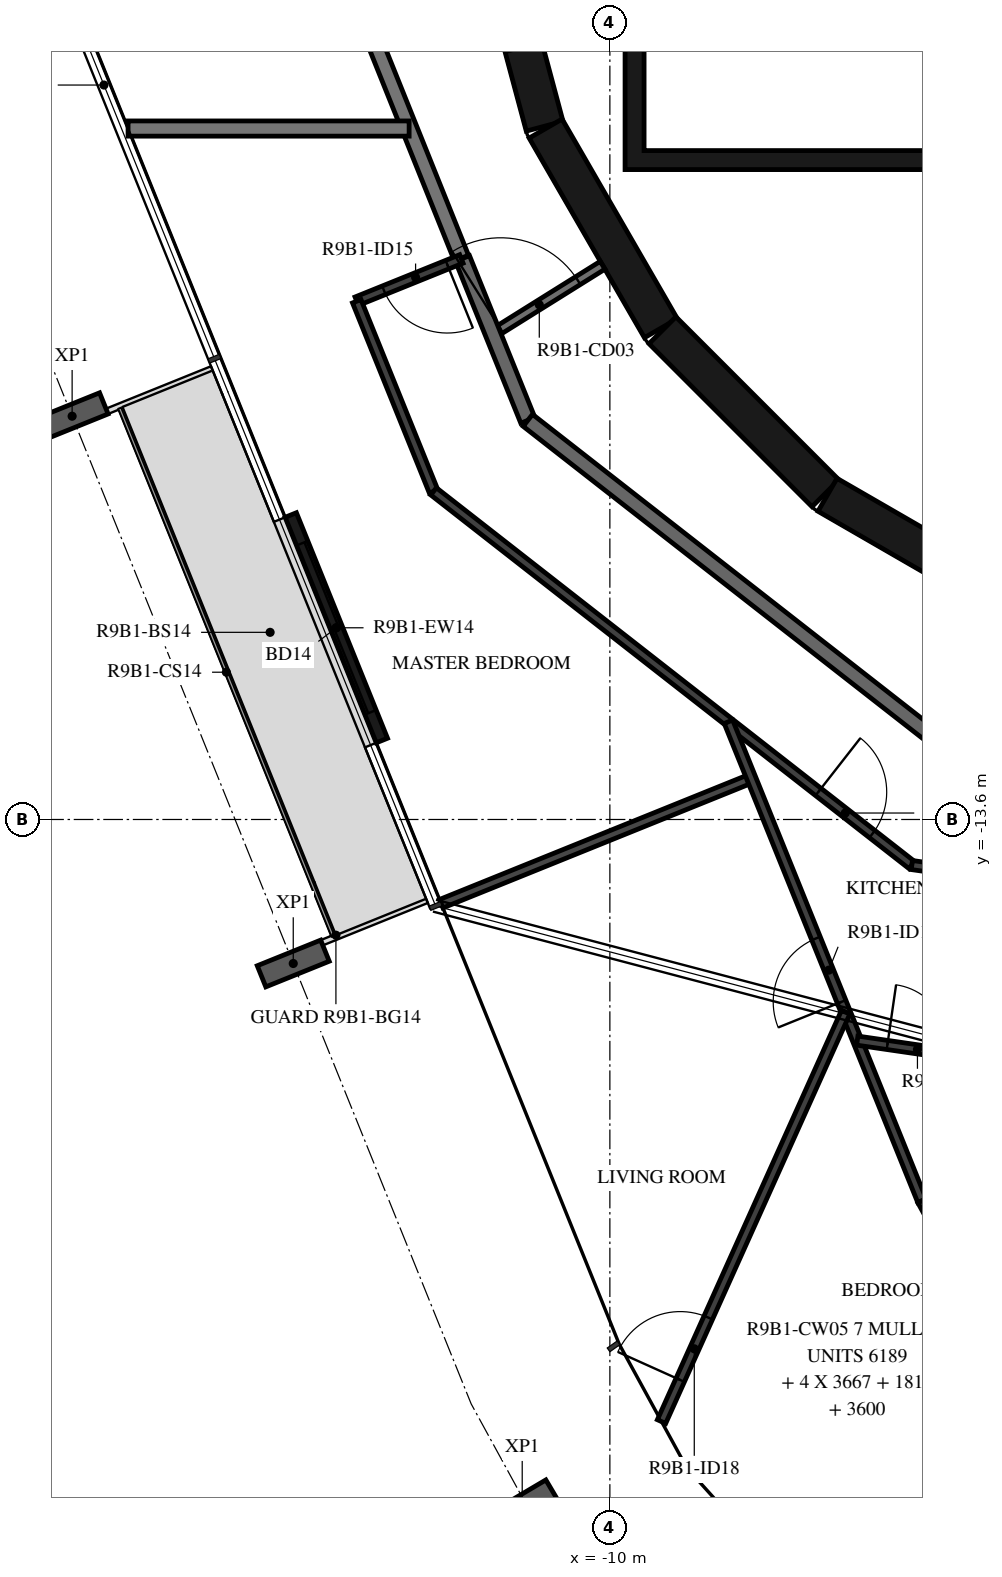
"""IFC4 building model, lengths in metres.
Left out: names, types, materials, properties, quantities, classifications, styles, units other than length and angle.
Written with IfcOpenShell. Run it as: python <this file> out.ifc"""

import sys

from ifc_helpers import new_model, si_unit, direction, frame, frame_2d, origin, origin_2d, place, context, subcontext, project, spatial, polyline, rectangle, i_section, outline, extrude, element, fill, save


model = new_model("IFC4")
c1 = context("Model", 3, precision=1e-05, world=origin(), true_north=direction((0.0, 1.0)))
c2 = subcontext(c1, "Body", "Model", "MODEL_VIEW")
j1 = project(units=[si_unit("LENGTHUNIT", "METRE"), si_unit("PLANEANGLEUNIT", "RADIAN")], contexts=[c1])
p1 = place(None, origin())
s1 = spatial("IfcSite", under=j1, at=p1, CompositionType="ELEMENT")
p2 = place(p1, origin())
s2 = spatial("IfcBuilding", under=s1, at=p2, CompositionType="ELEMENT")
p3 = place(p2, frame((0.0, 0.0, 343.5)))
s3 = spatial("IfcBuildingStorey", under=s2, at=p3, CompositionType="ELEMENT", Elevation=343.5)
for number, where, z_axis, x_axis in (
    (1, (-17.075, -8.294, -0.38), (0.0, 0.0, 1.0), (-0.375, 0.927, 0.0)),
    (2, (-14.166, -15.495, -0.38), (0.0, 0.0, 1.0), (-0.375, 0.927, 0.0)),
    (3, (-11.153, -22.647, -0.38), (0.0, 0.0, 1.0), (-0.509, 0.861, 0.0)),
):
    element("IfcColumn", number, at=place(p3, frame(where, z_axis=z_axis, x_axis=x_axis)), inside=s3, PredefinedType="COLUMN", context=c2, shape_type="SweptSolid", body=[
        extrude(i_section(OverallWidth=0.3, OverallDepth=0.9, WebThickness=0.019, FlangeThickness=0.035, FilletRadius=0.03, at=origin_2d()), origin(), (0.0, 0.0, 1.0), 3.5),
    ])
p4 = place(p3, frame((-14.198, -9.594, 0.0), z_axis=(0.0, 0.0, 1.0), x_axis=(0.374624519695, -0.927176611678, 0.0)))
e4 = element("IfcWall", 4, at=p4, inside=s3, PredefinedType="STANDARD", context=c2, shape_type="SweptSolid", body=[
    extrude(rectangle(XDim=3.2, YDim=0.16, at=frame_2d((1.6, 0.0))), origin(), (0.0, 0.0, 1.0), 3.12),
])
p5 = place(p4, frame((0.4, 0.0, 0.0)))
e5 = element("IfcOpeningElement", 5, at=p5, cuts=e4, PredefinedType="OPENING", context=c2, shape_type="SweptSolid", body=[
    extrude(rectangle(XDim=2.4, YDim=2.4, at=frame_2d((1.2, 1.2))), frame((0.0, 0.09, 0.0), z_axis=(0.0, -1.0, 0.0), x_axis=(1.0, 0.0, 0.0)), (0.0, 0.0, 1.0), 0.18),
])
p6 = place(p3, frame((-11.643, -1.55, 0.0), z_axis=(0.0, 0.0, 1.0), x_axis=(0.258734743916, -0.965948410781, 0.0)))
e6 = element("IfcWall", 6, at=p6, inside=s3, PredefinedType="SHEAR", context=c2, shape_type="SweptSolid", body=[
    extrude(rectangle(XDim=3.033, YDim=0.5, at=frame_2d((1.516, 0.0))), origin(), (0.0, 0.0, 1.0), 3.12),
])
p7 = place(p6, frame((1.066, 0.0, 0.0)))
e7 = element("IfcOpeningElement", 7, at=p7, cuts=e6, PredefinedType="OPENING", context=c2, shape_type="SweptSolid", body=[
    extrude(rectangle(XDim=0.9, YDim=2.1, at=frame_2d((0.45, 1.05))), frame((0.0, 0.26, 0.0), z_axis=(0.0, -1.0, 0.0), x_axis=(1.0, 0.0, 0.0)), (0.0, 0.0, 1.0), 0.52),
])
p8 = place(p3, frame((-10.845, -4.51, 0.0), z_axis=(0.0, 0.0, 1.0), x_axis=(0.500087131594, -0.865975092491, 0.0)))
e8 = element("IfcWall", 8, at=p8, inside=s3, PredefinedType="SHEAR", context=c2, shape_type="SweptSolid", body=[
    extrude(rectangle(XDim=3.033, YDim=0.5, at=frame_2d((1.516, 0.0))), origin(), (0.0, 0.0, 1.0), 3.12),
])
p9 = place(p3, frame((-9.308, -7.164, 0.0), z_axis=(0.0, 0.0, 1.0), x_axis=(0.707106781187, -0.707106781187, 0.0)))
e9 = element("IfcWall", 9, at=p9, inside=s3, PredefinedType="SHEAR", context=c2, shape_type="SweptSolid", body=[
    extrude(rectangle(XDim=3.032, YDim=0.5, at=frame_2d((1.516, 0.0))), origin(), (0.0, 0.0, 1.0), 3.12),
])
p10 = place(p3, frame((-7.137, -9.329, 0.0), z_axis=(0.0, 0.0, 1.0), x_axis=(0.865975092491, -0.500087131594, 0.0)))
e10 = element("IfcWall", 10, at=p10, inside=s3, PredefinedType="SHEAR", context=c2, shape_type="SweptSolid", body=[
    extrude(rectangle(XDim=3.033, YDim=0.5, at=frame_2d((1.516, 0.0))), origin(), (0.0, 0.0, 1.0), 3.12),
])
p11 = place(p3, origin())
e11 = element("IfcWall", 11, at=p11, inside=s3, PredefinedType="SHEAR", context=c2, shape_type="SweptSolid", body=[
    extrude(outline(polyline([(9.8, -5.05), (9.8, -4.8), (9.8, -1.9), (9.55, -1.9), (9.55, -4.8), (7.65, -4.8), (7.65, -1.9), (7.4, -1.9), (7.4, -4.8), (5.5, -4.8), (5.5, -1.9), (5.25, -1.9), (5.25, -4.8), (3.35, -4.8), (3.35, -1.9), (3.1, -1.9), (3.1, -4.8), (1.2, -4.8), (1.2, -1.9), (0.95, -1.9), (0.95, -4.8), (-0.95, -4.8), (-0.95, -1.9), (-1.2, -1.9), (-1.2, -4.8), (-3.1, -4.8), (-3.1, -1.9), (-3.35, -1.9), (-3.35, -4.8), (-5.25, -4.8), (-5.25, -1.9), (-5.5, -1.9), (-5.5, -4.8), (-9.55, -4.8), (-9.55, -1.9), (-9.8, -1.9), (-9.8, -4.8), (-9.8, -5.05), (9.8, -5.05)])), origin(), (0.0, 0.0, 1.0), 3.12),
])
p12 = place(p3, frame((-11.539, -7.21, 0.0), z_axis=(0.0, 0.0, 1.0), x_axis=(0.848103039868, 0.529831325769, 0.0)))
e12 = element("IfcWall", 12, at=p12, inside=s3, PredefinedType="PARTITIONING", context=c2, shape_type="SweptSolid", body=[
    extrude(rectangle(XDim=1.702, YDim=0.12, at=frame_2d((0.851, 0.0))), origin(), (0.0, 0.0, 1.0), 3.12),
])
p13 = place(p12, frame((0.12, 0.0, 0.0)))
e13 = element("IfcOpeningElement", 13, at=p13, cuts=e12, PredefinedType="OPENING", context=c2, shape_type="SweptSolid", body=[
    extrude(rectangle(XDim=1.2, YDim=2.1, at=frame_2d((0.6, 1.05))), frame((0.0, 0.07, 0.0), z_axis=(0.0, -1.0, 0.0), x_axis=(1.0, 0.0, 0.0)), (0.0, 0.0, 1.0), 0.14),
])
p14 = place(p3, frame((-13.769, -1.691, 0.0), z_axis=(0.0, 0.0, 1.0), x_axis=(0.372720094028, -0.927943819155, 0.0)))
e14 = element("IfcWall", 14, at=p14, inside=s3, PredefinedType="STANDARD", context=c2, shape_type="SweptSolid", body=[
    extrude(rectangle(XDim=4.875, YDim=0.2, at=frame_2d((2.438, 0.0))), origin(), (0.0, 0.0, 1.0), 3.12),
])
p15 = place(p3, frame((-11.939, -6.22, 0.0), z_axis=(0.0, 0.0, 1.0), x_axis=(0.374651128394, -0.927165860024, 0.0)))
e15 = element("IfcWall", 15, at=p15, inside=s3, PredefinedType="STANDARD", context=c2, shape_type="SweptSolid", body=[
    extrude(rectangle(XDim=2.296, YDim=0.2, at=frame_2d((1.148, 0.0))), origin(), (0.0, 0.0, 1.0), 3.12),
])
p16 = place(p3, frame((-11.079, -8.349, 0.0), z_axis=(0.0, 0.0, 1.0), x_axis=(0.78800478687, -0.615669112324, 0.0)))
e16 = element("IfcWall", 16, at=p16, inside=s3, PredefinedType="STANDARD", context=c2, shape_type="SweptSolid", body=[
    extrude(rectangle(XDim=7.181, YDim=0.2, at=frame_2d((3.591, 0.0))), origin(), (0.0, 0.0, 1.0), 3.12),
])
p17 = place(p3, frame((-16.339, -4.51, 0.0), z_axis=(0.0, 0.0, 1.0), x_axis=(1.0, 0.0, 0.0)))
e17 = element("IfcWall", 17, at=p17, inside=s3, PredefinedType="STANDARD", context=c2, shape_type="SweptSolid", body=[
    extrude(rectangle(XDim=3.698, YDim=0.2, at=frame_2d((1.849, 0.0))), origin(), (0.0, 0.0, 1.0), 3.12),
])
p18 = place(p3, frame((-11.953, -6.225, 0.0), z_axis=(0.0, 0.0, 1.0), x_axis=(-0.927144096717, -0.374704982518, 0.0)))
e18 = element("IfcWall", 18, at=p18, inside=s3, PredefinedType="PARTITIONING", context=c2, shape_type="SweptSolid", body=[
    extrude(rectangle(XDim=1.485, YDim=0.12, at=frame_2d((0.742, 0.0))), origin(), (0.0, 0.0, 1.0), 3.12),
])
p19 = place(p18, frame((0.2, 0.0, 0.0)))
e19 = element("IfcOpeningElement", 19, at=p19, cuts=e18, PredefinedType="OPENING", context=c2, shape_type="SweptSolid", body=[
    extrude(rectangle(XDim=0.9, YDim=2.1, at=frame_2d((0.45, 1.05))), frame((0.0, 0.07, 0.0), z_axis=(0.0, -1.0, 0.0), x_axis=(1.0, 0.0, 0.0)), (0.0, 0.0, 1.0), 0.14),
])
p20 = place(p3, frame((-13.33, -6.782, 0.0), z_axis=(0.0, 0.0, 1.0), x_axis=(0.374602180132, -0.927185637637, 0.0)))
e20 = element("IfcWall", 20, at=p20, inside=s3, PredefinedType="PARTITIONING", context=c2, shape_type="SweptSolid", body=[
    extrude(rectangle(XDim=2.698, YDim=0.12, at=frame_2d((1.349, 0.0))), origin(), (0.0, 0.0, 1.0), 3.12),
])
p21 = place(p3, frame((-12.319, -9.283, 0.0), z_axis=(0.0, 0.0, 1.0), x_axis=(0.788000268464, -0.61567489546, 0.0)))
e21 = element("IfcWall", 21, at=p21, inside=s3, PredefinedType="PARTITIONING", context=c2, shape_type="SweptSolid", body=[
    extrude(rectangle(XDim=7.985, YDim=0.12, at=frame_2d((3.992, 0.0))), origin(), (0.0, 0.0, 1.0), 3.12),
])
p22 = place(p21, frame((6.423, 0.0, 0.0)))
e22 = element("IfcOpeningElement", 22, at=p22, cuts=e21, PredefinedType="OPENING", context=c2, shape_type="SweptSolid", body=[
    extrude(rectangle(XDim=0.9, YDim=2.1, at=frame_2d((0.45, 1.05))), frame((0.0, 0.07, 0.0), z_axis=(0.0, -1.0, 0.0), x_axis=(1.0, 0.0, 0.0)), (0.0, 0.0, 1.0), 0.14),
])
p23 = place(p3, frame((-6.027, -14.199, 0.0), z_axis=(0.0, 0.0, 1.0), x_axis=(0.990271617837, -0.139147845494, 0.0)))
e23 = element("IfcWall", 23, at=p23, inside=s3, PredefinedType="PARTITIONING", context=c2, shape_type="SweptSolid", body=[
    extrude(rectangle(XDim=7.308, YDim=0.12, at=frame_2d((3.654, 0.0))), origin(), (0.0, 0.0, 1.0), 3.12),
])
p24 = place(p23, frame((5.093, 0.0, 0.0)))
e24 = element("IfcOpeningElement", 24, at=p24, cuts=e23, PredefinedType="OPENING", context=c2, shape_type="SweptSolid", body=[
    extrude(rectangle(XDim=0.8, YDim=2.1, at=frame_2d((0.4, 1.05))), frame((0.0, 0.07, 0.0), z_axis=(0.0, -1.0, 0.0), x_axis=(1.0, 0.0, 0.0)), (0.0, 0.0, 1.0), 0.14),
])
p25 = place(p3, frame((-12.219, -14.708, 0.0), z_axis=(0.0, 0.0, 1.0), x_axis=(0.927189216671, 0.374593321469, 0.0)))
e25 = element("IfcWall", 25, at=p25, inside=s3, PredefinedType="PARTITIONING", context=c2, shape_type="SweptSolid", body=[
    extrude(rectangle(XDim=4.4, YDim=0.12, at=frame_2d((2.2, 0.0))), origin(), (0.0, 0.0, 1.0), 2.73),
])
p26 = place(p3, frame((-5.894, -18.616, 0.0), z_axis=(0.0, 0.0, 1.0), x_axis=(-0.374596683143, 0.927187858515, 0.0)))
e26 = element("IfcWall", 26, at=p26, inside=s3, PredefinedType="PARTITIONING", context=c2, shape_type="SweptSolid", body=[
    extrude(rectangle(XDim=6.796, YDim=0.12, at=frame_2d((3.398, 0.0))), origin(), (0.0, 0.0, 1.0), 3.12),
])
p27 = place(p26, frame((2.822, 0.0, 0.0)))
e27 = element("IfcOpeningElement", 27, at=p27, cuts=e26, PredefinedType="OPENING", context=c2, shape_type="SweptSolid", body=[
    extrude(rectangle(XDim=0.9, YDim=2.1, at=frame_2d((0.45, 1.05))), frame((0.0, 0.07, 0.0), z_axis=(0.0, -1.0, 0.0), x_axis=(1.0, 0.0, 0.0)), (0.0, 0.0, 1.0), 0.14),
])
p28 = place(p3, frame((-9.32, -21.521, 0.0), z_axis=(0.0, 0.0, 1.0), x_axis=(0.410206582363, 0.911992631432, 0.0)))
e28 = element("IfcWall", 28, at=p28, inside=s3, PredefinedType="PARTITIONING", context=c2, shape_type="SweptSolid", body=[
    extrude(rectangle(XDim=5.908, YDim=0.12, at=frame_2d((2.954, 0.0))), origin(), (0.0, 0.0, 1.0), 3.12),
])
p29 = place(p28, frame((0.6, 0.0, 0.0)))
e29 = element("IfcOpeningElement", 29, at=p29, cuts=e28, PredefinedType="OPENING", context=c2, shape_type="SweptSolid", body=[
    extrude(rectangle(XDim=0.9, YDim=2.1, at=frame_2d((0.45, 1.05))), frame((0.0, 0.07, 0.0), z_axis=(0.0, -1.0, 0.0), x_axis=(1.0, 0.0, 0.0)), (0.0, 0.0, 1.0), 0.14),
])
p30 = place(p3, frame((-6.745, -16.509, 0.0), z_axis=(0.0, 0.0, 1.0), x_axis=(0.989610924185, -0.143771411393, 0.0)))
e30 = element("IfcWall", 30, at=p30, inside=s3, PredefinedType="PARTITIONING", context=c2, shape_type="SweptSolid", body=[
    extrude(rectangle(XDim=2.865, YDim=0.12, at=frame_2d((1.432, 0.0))), origin(), (0.0, 0.0, 1.0), 3.12),
])
p31 = place(p30, frame((0.4, 0.0, 0.0)))
e31 = element("IfcOpeningElement", 31, at=p31, cuts=e30, PredefinedType="OPENING", context=c2, shape_type="SweptSolid", body=[
    extrude(rectangle(XDim=0.8, YDim=2.1, at=frame_2d((0.4, 1.05))), frame((0.0, 0.07, 0.0), z_axis=(0.0, -1.0, 0.0), x_axis=(1.0, 0.0, 0.0)), (0.0, 0.0, 1.0), 0.14),
])
p32 = place(p3, frame((-5.373, -19.57, 0.0), z_axis=(0.0, 0.0, 1.0), x_axis=(-0.479796131471, 0.87738000446, 0.0)))
e32 = element("IfcWall", 32, at=p32, inside=s3, PredefinedType="PARTITIONING", context=c2, shape_type="SweptSolid", body=[
    extrude(rectangle(XDim=1.087, YDim=0.12, at=frame_2d((0.543, 0.0))), origin(), (0.0, 0.0, 1.0), 3.12),
])
p33 = place(p5, origin())
e33 = element("IfcDoor", 33, at=p33, inside=s3, OperationType="DOUBLE_DOOR_SLIDING", PredefinedType="DOOR", context=c2, shape_type="SweptSolid", body=[
    extrude(rectangle(XDim=2.4, YDim=2.4, at=frame_2d((1.2, 1.2))), frame((0.0, 0.025, 0.0), z_axis=(0.0, -1.0, 0.0), x_axis=(1.0, 0.0, 0.0)), (0.0, 0.0, 1.0), 0.05),
])
fill(e5, e33)
p34 = place(p19, origin())
e34 = element("IfcDoor", 34, at=p34, inside=s3, OperationType="SINGLE_SWING_LEFT", PredefinedType="DOOR", context=c2, shape_type="SweptSolid", body=[
    extrude(rectangle(XDim=0.9, YDim=2.1, at=frame_2d((0.45, 1.05))), frame((0.0, 0.025, 0.0), z_axis=(0.0, -1.0, 0.0), x_axis=(1.0, 0.0, 0.0)), (0.0, 0.0, 1.0), 0.05),
])
fill(e19, e34)
p35 = place(p22, origin())
e35 = element("IfcDoor", 35, at=p35, inside=s3, OperationType="SINGLE_SWING_RIGHT", PredefinedType="DOOR", context=c2, shape_type="SweptSolid", body=[
    extrude(rectangle(XDim=0.9, YDim=2.1, at=frame_2d((0.45, 1.05))), frame((0.0, 0.025, 0.0), z_axis=(0.0, -1.0, 0.0), x_axis=(1.0, 0.0, 0.0)), (0.0, 0.0, 1.0), 0.05),
])
fill(e22, e35)
p36 = place(p27, origin())
e36 = element("IfcDoor", 36, at=p36, inside=s3, OperationType="SINGLE_SWING_RIGHT", PredefinedType="DOOR", context=c2, shape_type="SweptSolid", body=[
    extrude(rectangle(XDim=0.9, YDim=2.1, at=frame_2d((0.45, 1.05))), frame((0.0, 0.025, 0.0), z_axis=(0.0, -1.0, 0.0), x_axis=(1.0, 0.0, 0.0)), (0.0, 0.0, 1.0), 0.05),
])
fill(e27, e36)
p37 = place(p29, origin())
e37 = element("IfcDoor", 37, at=p37, inside=s3, OperationType="SINGLE_SWING_RIGHT", PredefinedType="DOOR", context=c2, shape_type="SweptSolid", body=[
    extrude(rectangle(XDim=0.9, YDim=2.1, at=frame_2d((0.45, 1.05))), frame((0.0, 0.025, 0.0), z_axis=(0.0, -1.0, 0.0), x_axis=(1.0, 0.0, 0.0)), (0.0, 0.0, 1.0), 0.05),
])
fill(e29, e37)
p38 = place(p31, origin())
e38 = element("IfcDoor", 38, at=p38, inside=s3, OperationType="SINGLE_SWING_RIGHT", PredefinedType="DOOR", context=c2, shape_type="SweptSolid", body=[
    extrude(rectangle(XDim=0.8, YDim=2.1, at=frame_2d((0.4, 1.05))), frame((0.0, 0.025, 0.0), z_axis=(0.0, -1.0, 0.0), x_axis=(1.0, 0.0, 0.0)), (0.0, 0.0, 1.0), 0.05),
])
fill(e31, e38)
p39 = place(p13, origin())
e39 = element("IfcDoor", 39, at=p39, inside=s3, OperationType="DOUBLE_DOOR_SINGLE_SWING", PredefinedType="DOOR", context=c2, shape_type="SweptSolid", body=[
    extrude(rectangle(XDim=1.2, YDim=2.1, at=frame_2d((0.6, 1.05))), frame((0.0, 0.025, 0.0), z_axis=(0.0, -1.0, 0.0), x_axis=(1.0, 0.0, 0.0)), (0.0, 0.0, 1.0), 0.05),
])
fill(e13, e39)
save(model, sys.argv[1])
